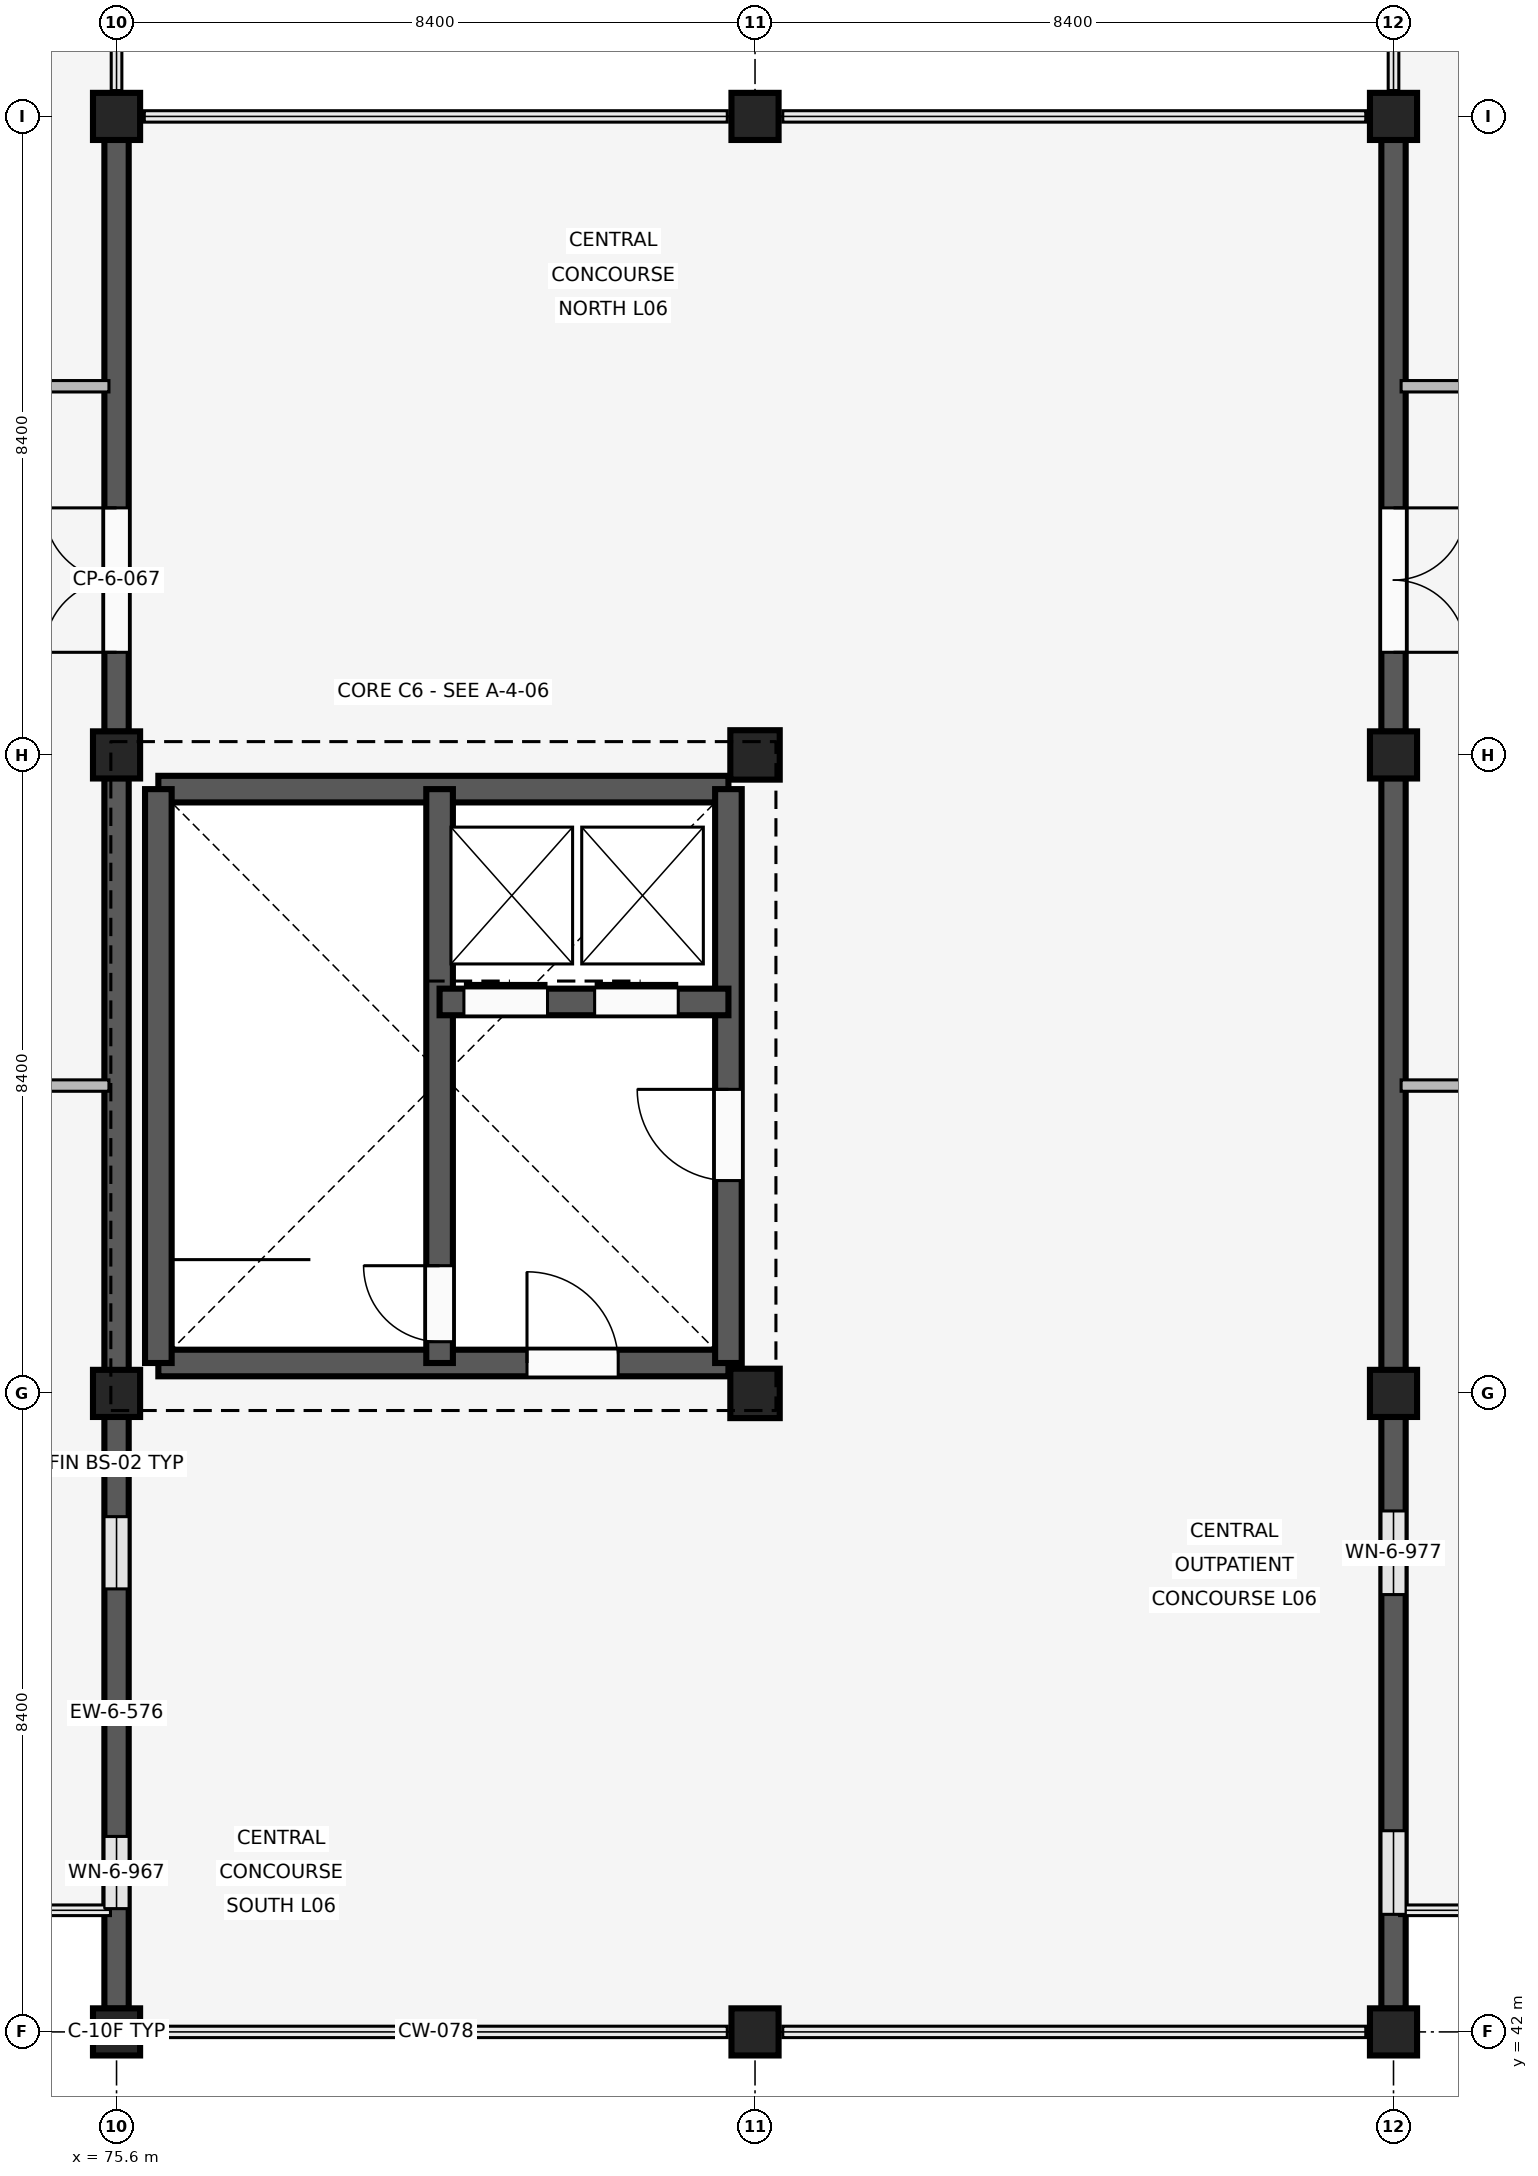
"""IFC4 building model, lengths in metres.
Left out: names, types, materials, properties, quantities, classifications, styles, units other than length and angle.
Written with IfcOpenShell. Run it as: python <this file> out.ifc"""

import sys

from ifc_helpers import new_model, si_unit, direction, frame, frame_2d, origin, origin_2d, place, context, subcontext, project, spatial, rectangle, extrude, element, fill, save


model = new_model("IFC4")
c1 = context("Model", 3, precision=1e-05, world=origin(), true_north=direction((0.0, 1.0)))
c2 = subcontext(c1, "Body", "Model", "MODEL_VIEW")
j1 = project(units=[si_unit("LENGTHUNIT", "METRE"), si_unit("PLANEANGLEUNIT", "RADIAN")], contexts=[c1])
p1 = place(None, origin())
s1 = spatial("IfcSite", under=j1, at=p1, CompositionType="ELEMENT")
p2 = place(p1, origin())
s2 = spatial("IfcBuilding", under=s1, at=p2, CompositionType="ELEMENT")
p3 = place(p2, frame((0.0, 0.0, 24.6)))
s3 = spatial("IfcBuildingStorey", under=s2, at=p3, CompositionType="ELEMENT", Elevation=24.6)
for number, where, z_axis, x_axis in (
    (1, (75.6, 42.0, 0.0), (0.0, 0.0, 1.0), (1.0, 0.0, 0.0)),
    (2, (75.6, 50.4, 0.0), (0.0, 0.0, 1.0), (1.0, 0.0, 0.0)),
    (3, (75.6, 58.8, 0.0), (0.0, 0.0, 1.0), (1.0, 0.0, 0.0)),
    (4, (75.6, 67.2, 0.0), (0.0, 0.0, 1.0), (1.0, 0.0, 0.0)),
    (5, (84.0, 42.0, 0.0), (0.0, 0.0, 1.0), (1.0, 0.0, 0.0)),
):
    element("IfcColumn", number, at=place(p3, frame(where, z_axis=z_axis, x_axis=x_axis)), inside=s3, PredefinedType="COLUMN", context=c2, shape_type="SweptSolid", body=[
        extrude(rectangle(XDim=0.62, YDim=0.62, at=origin_2d()), origin(), (0.0, 0.0, 1.0), 4.2),
    ])
for number, where, z_axis, x_axis in (
    (6, (84.0, 50.4, 0.0), (0.0, 0.0, 1.0), (1.0, 0.0, 0.0)),
    (7, (84.0, 58.8, 0.0), (0.0, 0.0, 1.0), (1.0, 0.0, 0.0)),
):
    element("IfcColumn", number, at=place(p3, frame(where, z_axis=z_axis, x_axis=x_axis)), inside=s3, PredefinedType="COLUMN", context=c2, shape_type="SweptSolid", body=[
        extrude(rectangle(XDim=0.65, YDim=0.65, at=origin_2d()), origin(), (0.0, 0.0, 1.0), 4.2),
    ])
for number, where, z_axis, x_axis in (
    (8, (84.0, 67.2, 0.0), (0.0, 0.0, 1.0), (1.0, 0.0, 0.0)),
    (9, (92.4, 42.0, 0.0), (0.0, 0.0, 1.0), (1.0, 0.0, 0.0)),
    (10, (92.4, 50.4, 0.0), (0.0, 0.0, 1.0), (1.0, 0.0, 0.0)),
    (11, (92.4, 58.8, 0.0), (0.0, 0.0, 1.0), (1.0, 0.0, 0.0)),
    (12, (92.4, 67.2, 0.0), (0.0, 0.0, 1.0), (1.0, 0.0, 0.0)),
):
    element("IfcColumn", number, at=place(p3, frame(where, z_axis=z_axis, x_axis=x_axis)), inside=s3, PredefinedType="COLUMN", context=c2, shape_type="SweptSolid", body=[
        extrude(rectangle(XDim=0.62, YDim=0.62, at=origin_2d()), origin(), (0.0, 0.0, 1.0), 4.2),
    ])
p4 = place(p3, frame((75.6, 42.305, 0.0), z_axis=(0.0, 0.0, 1.0), x_axis=(0.0, 1.0, 0.0)))
e13 = element("IfcWall", 13, at=p4, inside=s3, PredefinedType="SOLIDWALL", context=c2, shape_type="SweptSolid", body=[
    extrude(rectangle(XDim=7.79, YDim=0.32, at=frame_2d((3.895, 0.0))), origin(), (0.0, 0.0, 1.0), 3.34),
])
p5 = place(p4, frame((1.317, 0.0, 0.85)))
e14 = element("IfcOpeningElement", 14, at=p5, cuts=e13, PredefinedType="OPENING", context=c2, shape_type="SweptSolid", body=[
    extrude(rectangle(XDim=0.95, YDim=1.6, at=frame_2d((0.475, 0.8))), frame((0.0, 0.17, 0.0), z_axis=(0.0, -1.0, 0.0), x_axis=(1.0, 0.0, 0.0)), (0.0, 0.0, 1.0), 0.34),
])
p6 = place(p4, frame((5.523, 0.0, 0.85)))
e15 = element("IfcOpeningElement", 15, at=p6, cuts=e13, PredefinedType="OPENING", context=c2, shape_type="SweptSolid", body=[
    extrude(rectangle(XDim=0.95, YDim=1.6, at=frame_2d((0.475, 0.8))), frame((0.0, 0.17, 0.0), z_axis=(0.0, -1.0, 0.0), x_axis=(1.0, 0.0, 0.0)), (0.0, 0.0, 1.0), 0.34),
])
p7 = place(p3, frame((75.6, 50.705, 0.0), z_axis=(0.0, 0.0, 1.0), x_axis=(0.0, 1.0, 0.0)))
e16 = element("IfcWall", 16, at=p7, inside=s3, PredefinedType="SOLIDWALL", context=c2, shape_type="SweptSolid", body=[
    extrude(rectangle(XDim=7.79, YDim=0.32, at=frame_2d((3.895, 0.0))), origin(), (0.0, 0.0, 1.0), 3.34),
])
p8 = place(p3, frame((75.6, 59.105, 0.0), z_axis=(0.0, 0.0, 1.0), x_axis=(0.0, 1.0, 0.0)))
e17 = element("IfcWall", 17, at=p8, inside=s3, PredefinedType="SOLIDWALL", context=c2, shape_type="SweptSolid", body=[
    extrude(rectangle(XDim=7.79, YDim=0.32, at=frame_2d((3.895, 0.0))), origin(), (0.0, 0.0, 1.0), 3.34),
])
p9 = place(p8, frame((1.045, 0.0, 0.0)))
e18 = element("IfcOpeningElement", 18, at=p9, cuts=e17, PredefinedType="OPENING", context=c2, shape_type="SweptSolid", body=[
    extrude(rectangle(XDim=1.9, YDim=2.4, at=frame_2d((0.95, 1.2))), frame((0.0, 0.17, 0.0), z_axis=(0.0, -1.0, 0.0), x_axis=(1.0, 0.0, 0.0)), (0.0, 0.0, 1.0), 0.34),
])
p10 = place(p3, frame((92.4, 50.095, 0.0), z_axis=(0.0, 0.0, 1.0), x_axis=(0.0, -1.0, 0.0)))
e19 = element("IfcWall", 19, at=p10, inside=s3, PredefinedType="SOLIDWALL", context=c2, shape_type="SweptSolid", body=[
    extrude(rectangle(XDim=7.79, YDim=0.32, at=frame_2d((3.895, 0.0))), origin(), (0.0, 0.0, 1.0), 3.34),
])
p11 = place(p10, frame((1.242, 0.0, 0.85)))
e20 = element("IfcOpeningElement", 20, at=p11, cuts=e19, PredefinedType="OPENING", context=c2, shape_type="SweptSolid", body=[
    extrude(rectangle(XDim=1.1, YDim=1.6, at=frame_2d((0.55, 0.8))), frame((0.0, 0.17, 0.0), z_axis=(0.0, -1.0, 0.0), x_axis=(1.0, 0.0, 0.0)), (0.0, 0.0, 1.0), 0.34),
])
p12 = place(p10, frame((5.448, 0.0, 0.85)))
e21 = element("IfcOpeningElement", 21, at=p12, cuts=e19, PredefinedType="OPENING", context=c2, shape_type="SweptSolid", body=[
    extrude(rectangle(XDim=1.1, YDim=1.6, at=frame_2d((0.55, 0.8))), frame((0.0, 0.17, 0.0), z_axis=(0.0, -1.0, 0.0), x_axis=(1.0, 0.0, 0.0)), (0.0, 0.0, 1.0), 0.34),
])
p13 = place(p3, frame((92.4, 58.495, 0.0), z_axis=(0.0, 0.0, 1.0), x_axis=(0.0, -1.0, 0.0)))
e22 = element("IfcWall", 22, at=p13, inside=s3, PredefinedType="SOLIDWALL", context=c2, shape_type="SweptSolid", body=[
    extrude(rectangle(XDim=7.79, YDim=0.32, at=frame_2d((3.895, 0.0))), origin(), (0.0, 0.0, 1.0), 3.34),
])
p14 = place(p3, frame((92.4, 66.895, 0.0), z_axis=(0.0, 0.0, 1.0), x_axis=(0.0, -1.0, 0.0)))
e23 = element("IfcWall", 23, at=p14, inside=s3, PredefinedType="SOLIDWALL", context=c2, shape_type="SweptSolid", body=[
    extrude(rectangle(XDim=7.79, YDim=0.32, at=frame_2d((3.895, 0.0))), origin(), (0.0, 0.0, 1.0), 3.34),
])
p15 = place(p14, frame((4.845, 0.0, 0.0)))
e24 = element("IfcOpeningElement", 24, at=p15, cuts=e23, PredefinedType="OPENING", context=c2, shape_type="SweptSolid", body=[
    extrude(rectangle(XDim=1.9, YDim=2.4, at=frame_2d((0.95, 1.2))), frame((0.0, 0.17, 0.0), z_axis=(0.0, -1.0, 0.0), x_axis=(1.0, 0.0, 0.0)), (0.0, 0.0, 1.0), 0.34),
])
p16 = place(p3, frame((76.15, 50.8, 0.0), z_axis=(0.0, 0.0, 1.0), x_axis=(1.0, 0.0, 0.0)))
e25 = element("IfcWall", 25, at=p16, inside=s3, PredefinedType="SHEAR", context=c2, shape_type="SweptSolid", body=[
    extrude(rectangle(XDim=7.5, YDim=0.35, at=frame_2d((3.75, 0.0))), origin(), (0.0, 0.0, 1.0), 3.92),
])
p17 = place(p16, frame((4.85, 0.0, 0.0)))
e26 = element("IfcOpeningElement", 26, at=p17, cuts=e25, PredefinedType="OPENING", context=c2, shape_type="SweptSolid", body=[
    extrude(rectangle(XDim=1.2, YDim=2.2, at=frame_2d((0.6, 1.1))), frame((0.0, 0.185, 0.0), z_axis=(0.0, -1.0, 0.0), x_axis=(1.0, 0.0, 0.0)), (0.0, 0.0, 1.0), 0.37),
])
p18 = place(p3, frame((76.15, 58.35, 0.0), z_axis=(0.0, 0.0, 1.0), x_axis=(1.0, 0.0, 0.0)))
e27 = element("IfcWall", 27, at=p18, inside=s3, PredefinedType="SHEAR", context=c2, shape_type="SweptSolid", body=[
    extrude(rectangle(XDim=7.5, YDim=0.35, at=frame_2d((3.75, 0.0))), origin(), (0.0, 0.0, 1.0), 3.92),
])
p19 = place(p3, frame((76.15, 50.8, 0.0), z_axis=(0.0, 0.0, 1.0), x_axis=(0.0, 1.0, 0.0)))
e28 = element("IfcWall", 28, at=p19, inside=s3, PredefinedType="SHEAR", context=c2, shape_type="SweptSolid", body=[
    extrude(rectangle(XDim=7.55, YDim=0.35, at=frame_2d((3.775, 0.0))), origin(), (0.0, 0.0, 1.0), 3.92),
])
p20 = place(p3, frame((83.65, 50.8, 0.0), z_axis=(0.0, 0.0, 1.0), x_axis=(0.0, 1.0, 0.0)))
e29 = element("IfcWall", 29, at=p20, inside=s3, PredefinedType="SHEAR", context=c2, shape_type="SweptSolid", body=[
    extrude(rectangle(XDim=7.55, YDim=0.35, at=frame_2d((3.775, 0.0))), origin(), (0.0, 0.0, 1.0), 3.92),
])
p21 = place(p20, frame((2.4, 0.0, 0.0)))
e30 = element("IfcOpeningElement", 30, at=p21, cuts=e29, PredefinedType="OPENING", context=c2, shape_type="SweptSolid", body=[
    extrude(rectangle(XDim=1.2, YDim=2.2, at=frame_2d((0.6, 1.1))), frame((0.0, 0.185, 0.0), z_axis=(0.0, -1.0, 0.0), x_axis=(1.0, 0.0, 0.0)), (0.0, 0.0, 1.0), 0.37),
])
p22 = place(p3, frame((79.85, 50.8, 0.0), z_axis=(0.0, 0.0, 1.0), x_axis=(0.0, 1.0, 0.0)))
e31 = element("IfcWall", 31, at=p22, inside=s3, PredefinedType="SHEAR", context=c2, shape_type="SweptSolid", body=[
    extrude(rectangle(XDim=7.55, YDim=0.35, at=frame_2d((3.775, 0.0))), origin(), (0.0, 0.0, 1.0), 3.92),
])
p23 = place(p22, frame((0.28, 0.0, 0.0)))
e32 = element("IfcOpeningElement", 32, at=p23, cuts=e31, PredefinedType="OPENING", context=c2, shape_type="SweptSolid", body=[
    extrude(rectangle(XDim=1.0, YDim=2.15, at=frame_2d((0.5, 1.075))), frame((0.0, 0.185, 0.0), z_axis=(0.0, -1.0, 0.0), x_axis=(1.0, 0.0, 0.0)), (0.0, 0.0, 1.0), 0.37),
])
p24 = place(p3, frame((79.85, 55.55, 0.0), z_axis=(0.0, 0.0, 1.0), x_axis=(1.0, 0.0, 0.0)))
e33 = element("IfcWall", 33, at=p24, inside=s3, PredefinedType="SHEAR", context=c2, shape_type="SweptSolid", body=[
    extrude(rectangle(XDim=3.8, YDim=0.35, at=frame_2d((1.9, 0.0))), origin(), (0.0, 0.0, 1.0), 3.92),
])
p25 = place(p24, frame((0.32, 0.0, 0.0)))
e34 = element("IfcOpeningElement", 34, at=p25, cuts=e33, PredefinedType="OPENING", context=c2, shape_type="SweptSolid", body=[
    extrude(rectangle(XDim=1.1, YDim=2.15, at=frame_2d((0.55, 1.075))), frame((0.0, 0.185, 0.0), z_axis=(0.0, -1.0, 0.0), x_axis=(1.0, 0.0, 0.0)), (0.0, 0.0, 1.0), 0.37),
])
p26 = place(p24, frame((2.04, 0.0, 0.0)))
e35 = element("IfcOpeningElement", 35, at=p26, cuts=e33, PredefinedType="OPENING", context=c2, shape_type="SweptSolid", body=[
    extrude(rectangle(XDim=1.1, YDim=2.15, at=frame_2d((0.55, 1.075))), frame((0.0, 0.185, 0.0), z_axis=(0.0, -1.0, 0.0), x_axis=(1.0, 0.0, 0.0)), (0.0, 0.0, 1.0), 0.37),
])
p27 = place(p3, frame((59.7, 54.45, 0.0), z_axis=(0.0, 0.0, 1.0), x_axis=(1.0, 0.0, 0.0)))
e36 = element("IfcWall", 36, at=p27, inside=s3, PredefinedType="PARTITIONING", context=c2, shape_type="SweptSolid", body=[
    extrude(rectangle(XDim=15.8, YDim=0.15, at=frame_2d((7.9, 0.0))), origin(), (0.0, 0.0, 1.0), 3.49),
])
p28 = place(p27, frame((2.6, 0.0, 0.0)))
e37 = element("IfcOpeningElement", 37, at=p28, cuts=e36, PredefinedType="OPENING", context=c2, shape_type="SweptSolid", body=[
    extrude(rectangle(XDim=1.0, YDim=2.15, at=frame_2d((0.5, 1.075))), frame((0.0, 0.085, 0.0), z_axis=(0.0, -1.0, 0.0), x_axis=(1.0, 0.0, 0.0)), (0.0, 0.0, 1.0), 0.17),
])
p29 = place(p3, frame((59.7, 63.65, 0.0), z_axis=(0.0, 0.0, 1.0), x_axis=(1.0, 0.0, 0.0)))
e38 = element("IfcWall", 38, at=p29, inside=s3, PredefinedType="PARTITIONING", context=c2, shape_type="SweptSolid", body=[
    extrude(rectangle(XDim=15.8, YDim=0.15, at=frame_2d((7.9, 0.0))), origin(), (0.0, 0.0, 1.0), 3.49),
])
p30 = place(p29, frame((2.6, 0.0, 0.0)))
e39 = element("IfcOpeningElement", 39, at=p30, cuts=e38, PredefinedType="OPENING", context=c2, shape_type="SweptSolid", body=[
    extrude(rectangle(XDim=1.05, YDim=2.2, at=frame_2d((0.525, 1.1))), frame((0.0, 0.085, 0.0), z_axis=(0.0, -1.0, 0.0), x_axis=(1.0, 0.0, 0.0)), (0.0, 0.0, 1.0), 0.17),
])
p31 = place(p3, frame((92.5, 54.45, 0.0), z_axis=(0.0, 0.0, 1.0), x_axis=(1.0, 0.0, 0.0)))
e40 = element("IfcWall", 40, at=p31, inside=s3, PredefinedType="PARTITIONING", context=c2, shape_type="SweptSolid", body=[
    extrude(rectangle(XDim=15.8, YDim=0.15, at=frame_2d((7.9, 0.0))), origin(), (0.0, 0.0, 1.0), 3.49),
])
p32 = place(p31, frame((2.6, 0.0, 0.0)))
e41 = element("IfcOpeningElement", 41, at=p32, cuts=e40, PredefinedType="OPENING", context=c2, shape_type="SweptSolid", body=[
    extrude(rectangle(XDim=1.0, YDim=2.15, at=frame_2d((0.5, 1.075))), frame((0.0, 0.085, 0.0), z_axis=(0.0, -1.0, 0.0), x_axis=(1.0, 0.0, 0.0)), (0.0, 0.0, 1.0), 0.17),
])
p33 = place(p3, frame((92.5, 63.65, 0.0), z_axis=(0.0, 0.0, 1.0), x_axis=(1.0, 0.0, 0.0)))
e42 = element("IfcWall", 42, at=p33, inside=s3, PredefinedType="PARTITIONING", context=c2, shape_type="SweptSolid", body=[
    extrude(rectangle(XDim=15.8, YDim=0.15, at=frame_2d((7.9, 0.0))), origin(), (0.0, 0.0, 1.0), 3.49),
])
p34 = place(p33, frame((2.6, 0.0, 0.0)))
e43 = element("IfcOpeningElement", 43, at=p34, cuts=e42, PredefinedType="OPENING", context=c2, shape_type="SweptSolid", body=[
    extrude(rectangle(XDim=1.05, YDim=2.2, at=frame_2d((0.525, 1.1))), frame((0.0, 0.085, 0.0), z_axis=(0.0, -1.0, 0.0), x_axis=(1.0, 0.0, 0.0)), (0.0, 0.0, 1.0), 0.17),
])
p35 = place(p5, origin())
e44 = element("IfcWindow", 44, at=p35, inside=s3, PartitioningType="SINGLE_PANEL", PredefinedType="WINDOW", context=c2, shape_type="SweptSolid", body=[
    extrude(rectangle(XDim=0.95, YDim=1.6, at=frame_2d((0.475, 0.8))), frame((0.0, 0.03, 0.0), z_axis=(0.0, -1.0, 0.0), x_axis=(1.0, 0.0, 0.0)), (0.0, 0.0, 1.0), 0.06),
])
fill(e14, e44)
p36 = place(p6, origin())
e45 = element("IfcWindow", 45, at=p36, inside=s3, PartitioningType="SINGLE_PANEL", PredefinedType="WINDOW", context=c2, shape_type="SweptSolid", body=[
    extrude(rectangle(XDim=0.95, YDim=1.6, at=frame_2d((0.475, 0.8))), frame((0.0, 0.03, 0.0), z_axis=(0.0, -1.0, 0.0), x_axis=(1.0, 0.0, 0.0)), (0.0, 0.0, 1.0), 0.06),
])
fill(e15, e45)
p37 = place(p9, origin())
e46 = element("IfcDoor", 46, at=p37, inside=s3, OperationType="DOUBLE_SWING_LEFT", PredefinedType="DOOR", context=c2, shape_type="SweptSolid", body=[
    extrude(rectangle(XDim=1.9, YDim=2.4, at=frame_2d((0.95, 1.2))), frame((0.0, 0.025, 0.0), z_axis=(0.0, -1.0, 0.0), x_axis=(1.0, 0.0, 0.0)), (0.0, 0.0, 1.0), 0.05),
])
fill(e18, e46)
p38 = place(p11, origin())
e47 = element("IfcWindow", 47, at=p38, inside=s3, PartitioningType="SINGLE_PANEL", PredefinedType="WINDOW", context=c2, shape_type="SweptSolid", body=[
    extrude(rectangle(XDim=1.1, YDim=1.6, at=frame_2d((0.55, 0.8))), frame((0.0, 0.03, 0.0), z_axis=(0.0, -1.0, 0.0), x_axis=(1.0, 0.0, 0.0)), (0.0, 0.0, 1.0), 0.06),
])
fill(e20, e47)
p39 = place(p12, origin())
e48 = element("IfcWindow", 48, at=p39, inside=s3, PartitioningType="SINGLE_PANEL", PredefinedType="WINDOW", context=c2, shape_type="SweptSolid", body=[
    extrude(rectangle(XDim=1.1, YDim=1.6, at=frame_2d((0.55, 0.8))), frame((0.0, 0.03, 0.0), z_axis=(0.0, -1.0, 0.0), x_axis=(1.0, 0.0, 0.0)), (0.0, 0.0, 1.0), 0.06),
])
fill(e21, e48)
p40 = place(p15, origin())
e49 = element("IfcDoor", 49, at=p40, inside=s3, OperationType="DOUBLE_SWING_LEFT", PredefinedType="DOOR", context=c2, shape_type="SweptSolid", body=[
    extrude(rectangle(XDim=1.9, YDim=2.4, at=frame_2d((0.95, 1.2))), frame((0.0, 0.025, 0.0), z_axis=(0.0, -1.0, 0.0), x_axis=(1.0, 0.0, 0.0)), (0.0, 0.0, 1.0), 0.05),
])
fill(e24, e49)
p41 = place(p21, origin())
e50 = element("IfcDoor", 50, at=p41, inside=s3, OperationType="SINGLE_SWING_RIGHT", PredefinedType="DOOR", context=c2, shape_type="SweptSolid", body=[
    extrude(rectangle(XDim=1.2, YDim=2.2, at=frame_2d((0.6, 1.1))), frame((0.0, 0.025, 0.0), z_axis=(0.0, -1.0, 0.0), x_axis=(1.0, 0.0, 0.0)), (0.0, 0.0, 1.0), 0.05),
])
fill(e30, e50)
p42 = place(p17, origin())
e51 = element("IfcDoor", 51, at=p42, inside=s3, OperationType="SINGLE_SWING_LEFT", PredefinedType="DOOR", context=c2, shape_type="SweptSolid", body=[
    extrude(rectangle(XDim=1.2, YDim=2.2, at=frame_2d((0.6, 1.1))), frame((0.0, 0.025, 0.0), z_axis=(0.0, -1.0, 0.0), x_axis=(1.0, 0.0, 0.0)), (0.0, 0.0, 1.0), 0.05),
])
fill(e26, e51)
p43 = place(p23, origin())
e52 = element("IfcDoor", 52, at=p43, inside=s3, OperationType="SINGLE_SWING_RIGHT", PredefinedType="DOOR", context=c2, shape_type="SweptSolid", body=[
    extrude(rectangle(XDim=1.0, YDim=2.15, at=frame_2d((0.5, 1.075))), frame((0.0, 0.025, 0.0), z_axis=(0.0, -1.0, 0.0), x_axis=(1.0, 0.0, 0.0)), (0.0, 0.0, 1.0), 0.05),
])
fill(e32, e52)
p44 = place(p25, origin())
e53 = element("IfcDoor", 53, at=p44, inside=s3, OperationType="SLIDING_TO_LEFT", PredefinedType="DOOR", context=c2, shape_type="SweptSolid", body=[
    extrude(rectangle(XDim=1.1, YDim=2.15, at=frame_2d((0.55, 1.075))), frame((0.0, 0.025, 0.0), z_axis=(0.0, -1.0, 0.0), x_axis=(1.0, 0.0, 0.0)), (0.0, 0.0, 1.0), 0.05),
])
fill(e34, e53)
p45 = place(p26, origin())
e54 = element("IfcDoor", 54, at=p45, inside=s3, OperationType="SLIDING_TO_LEFT", PredefinedType="DOOR", context=c2, shape_type="SweptSolid", body=[
    extrude(rectangle(XDim=1.1, YDim=2.15, at=frame_2d((0.55, 1.075))), frame((0.0, 0.025, 0.0), z_axis=(0.0, -1.0, 0.0), x_axis=(1.0, 0.0, 0.0)), (0.0, 0.0, 1.0), 0.05),
])
fill(e35, e54)
save(model, sys.argv[1])
